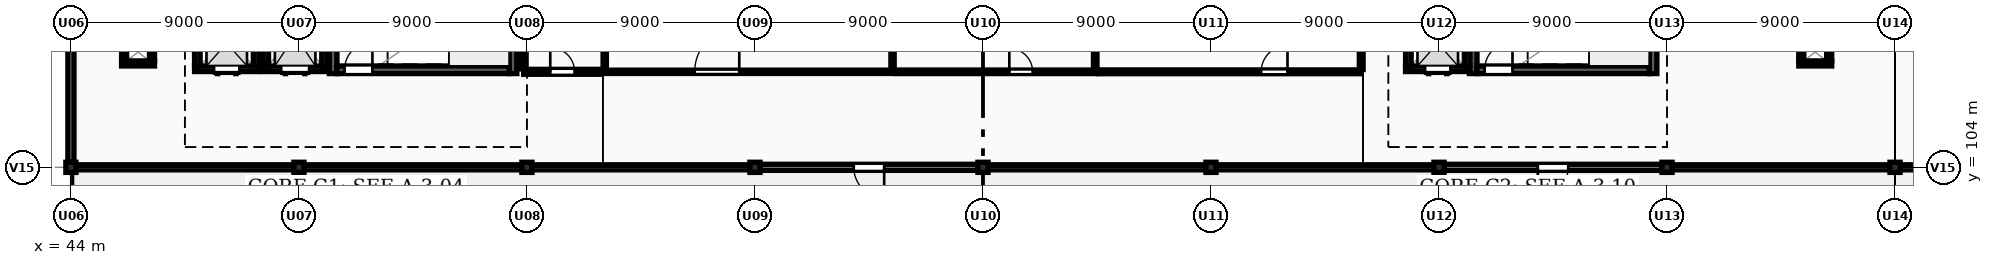
"""IFC4 building model, lengths in metres.
Left out: names, types, materials, properties, quantities, classifications, styles, units other than length and angle.
Written with IfcOpenShell. Run it as: python <this file> out.ifc"""

import sys

from ifc_helpers import new_model, si_unit, direction, frame, frame_2d, origin, origin_2d, place, context, subcontext, project, spatial, rectangle, extrude, element, fill, save


model = new_model("IFC4")
c1 = context("Model", 3, precision=1e-05, world=origin(), true_north=direction((0.0, 1.0)))
c2 = subcontext(c1, "Body", "Model", "MODEL_VIEW")
j1 = project(units=[si_unit("LENGTHUNIT", "METRE"), si_unit("PLANEANGLEUNIT", "RADIAN")], contexts=[c1])
p1 = place(None, origin())
s1 = spatial("IfcSite", under=j1, at=p1, CompositionType="ELEMENT")
p2 = place(p1, origin())
s2 = spatial("IfcBuilding", under=s1, at=p2, CompositionType="ELEMENT")
p3 = place(p2, frame((0.0, 0.0, 12.3)))
s3 = spatial("IfcBuildingStorey", under=s2, at=p3, CompositionType="ELEMENT", Elevation=12.3)
for number, where, z_axis, x_axis in (
    (1, (44.0, 104.0, 0.0), (0.0, 0.0, 1.0), (1.0, 0.0, 0.0)),
    (2, (53.0, 104.0, 0.0), (0.0, 0.0, 1.0), (1.0, 0.0, 0.0)),
    (3, (62.0, 104.0, 0.0), (0.0, 0.0, 1.0), (1.0, 0.0, 0.0)),
    (4, (71.0, 104.0, 0.0), (0.0, 0.0, 1.0), (1.0, 0.0, 0.0)),
    (5, (80.0, 104.0, 0.0), (0.0, 0.0, 1.0), (1.0, 0.0, 0.0)),
    (6, (89.0, 104.0, 0.0), (0.0, 0.0, 1.0), (1.0, 0.0, 0.0)),
    (7, (98.0, 104.0, 0.0), (0.0, 0.0, 1.0), (1.0, 0.0, 0.0)),
    (8, (107.0, 104.0, 0.0), (0.0, 0.0, 1.0), (1.0, 0.0, 0.0)),
    (9, (116.0, 104.0, 0.0), (0.0, 0.0, 1.0), (1.0, 0.0, 0.0)),
):
    element("IfcColumn", number, at=place(p3, frame(where, z_axis=z_axis, x_axis=x_axis)), inside=s3, PredefinedType="COLUMN", context=c2, shape_type="SweptSolid", body=[
        extrude(rectangle(XDim=0.4, YDim=0.4, at=origin_2d()), origin(), (0.0, 0.0, 1.0), 3.9),
    ])
p4 = place(p3, frame((115.8, 104.0, 0.0), z_axis=(0.0, 0.0, 1.0), x_axis=(-1.0, 0.0, 0.0)))
e10 = element("IfcWall", 10, at=p4, inside=s3, PredefinedType="SOLIDWALL", context=c2, shape_type="SweptSolid", body=[
    extrude(rectangle(XDim=8.6, YDim=0.2, at=frame_2d((4.3, 0.0))), origin(), (0.0, 0.0, 1.0), 0.95),
])
p5 = place(p3, frame((106.8, 104.0, 0.0), z_axis=(0.0, 0.0, 1.0), x_axis=(-1.0, 0.0, 0.0)))
e11 = element("IfcWall", 11, at=p5, inside=s3, PredefinedType="SOLIDWALL", context=c2, shape_type="SweptSolid", body=[
    extrude(rectangle(XDim=8.6, YDim=0.24, at=frame_2d((4.3, 0.0))), origin(), (0.0, 0.0, 1.0), 3.008),
])
p6 = place(p5, frame((3.7, 0.0, 0.0)))
e12 = element("IfcOpeningElement", 12, at=p6, cuts=e11, PredefinedType="OPENING", context=c2, shape_type="SweptSolid", body=[
    extrude(rectangle(XDim=1.2, YDim=2.15, at=frame_2d((0.6, 1.075))), frame((0.0, 0.13, 0.0), z_axis=(0.0, -1.0, 0.0), x_axis=(1.0, 0.0, 0.0)), (0.0, 0.0, 1.0), 0.26),
])
for number, where, z_axis, x_axis in (
    (13, (97.8, 104.0, 0.0), (0.0, 0.0, 1.0), (-1.0, 0.0, 0.0)),
    (14, (88.8, 104.0, 0.0), (0.0, 0.0, 1.0), (-1.0, 0.0, 0.0)),
):
    element("IfcWall", number, at=place(p3, frame(where, z_axis=z_axis, x_axis=x_axis)), inside=s3, PredefinedType="SOLIDWALL", context=c2, shape_type="SweptSolid", body=[
        extrude(rectangle(XDim=8.6, YDim=0.2, at=frame_2d((4.3, 0.0))), origin(), (0.0, 0.0, 1.0), 0.95),
    ])
p7 = place(p3, frame((79.8, 104.0, 0.0), z_axis=(0.0, 0.0, 1.0), x_axis=(-1.0, 0.0, 0.0)))
e15 = element("IfcWall", 15, at=p7, inside=s3, PredefinedType="SOLIDWALL", context=c2, shape_type="SweptSolid", body=[
    extrude(rectangle(XDim=8.6, YDim=0.24, at=frame_2d((4.3, 0.0))), origin(), (0.0, 0.0, 1.0), 3.008),
])
p8 = place(p7, frame((3.7, 0.0, 0.0)))
e16 = element("IfcOpeningElement", 16, at=p8, cuts=e15, PredefinedType="OPENING", context=c2, shape_type="SweptSolid", body=[
    extrude(rectangle(XDim=1.2, YDim=2.15, at=frame_2d((0.6, 1.075))), frame((0.0, 0.13, 0.0), z_axis=(0.0, -1.0, 0.0), x_axis=(1.0, 0.0, 0.0)), (0.0, 0.0, 1.0), 0.26),
])
for number, where, z_axis, x_axis in (
    (17, (70.8, 104.0, 0.0), (0.0, 0.0, 1.0), (-1.0, 0.0, 0.0)),
    (18, (61.8, 104.0, 0.0), (0.0, 0.0, 1.0), (-1.0, 0.0, 0.0)),
    (19, (52.8, 104.0, 0.0), (0.0, 0.0, 1.0), (-1.0, 0.0, 0.0)),
):
    element("IfcWall", number, at=place(p3, frame(where, z_axis=z_axis, x_axis=x_axis)), inside=s3, PredefinedType="SOLIDWALL", context=c2, shape_type="SweptSolid", body=[
        extrude(rectangle(XDim=8.6, YDim=0.2, at=frame_2d((4.3, 0.0))), origin(), (0.0, 0.0, 1.0), 0.95),
    ])
p9 = place(p3, frame((44.0, 104.2, 0.0), z_axis=(0.0, 0.0, 1.0), x_axis=(0.0, 1.0, 0.0)))
e20 = element("IfcWall", 20, at=p9, inside=s3, PredefinedType="SOLIDWALL", context=c2, shape_type="SweptSolid", body=[
    extrude(rectangle(XDim=7.6, YDim=0.24, at=frame_2d((3.8, 0.0))), origin(), (0.0, 0.0, 1.0), 3.29),
])
p10 = place(p3, frame((126.8, 104.0, 0.0), z_axis=(0.0, 0.0, 1.0), x_axis=(-1.0, 0.0, 0.0)))
e21 = element("IfcWall", 21, at=p10, inside=s3, PredefinedType="SOLIDWALL", context=c2, shape_type="SweptSolid", body=[
    extrude(rectangle(XDim=10.6, YDim=0.2, at=frame_2d((5.3, 0.0))), origin(), (0.0, 0.0, 1.0), 0.95),
])
for number, where, z_axis, x_axis in (
    (22, (54.35, 107.7, 0.0), (0.0, 0.0, 1.0), (0.0, 1.0, 0.0)),
    (23, (61.45, 111.8, 0.0), (0.0, 0.0, 1.0), (0.0, -1.0, 0.0)),
):
    element("IfcWall", number, at=place(p3, frame(where, z_axis=z_axis, x_axis=x_axis)), inside=s3, PredefinedType="SHEAR", context=c2, shape_type="SweptSolid", body=[
        extrude(rectangle(XDim=4.1, YDim=0.3, at=frame_2d((2.05, 0.0))), origin(), (0.0, 0.0, 1.0), 3.65),
    ])
p11 = place(p3, frame((54.5, 107.85, 0.0), z_axis=(0.0, 0.0, 1.0), x_axis=(1.0, 0.0, 0.0)))
e24 = element("IfcWall", 24, at=p11, inside=s3, PredefinedType="SHEAR", context=c2, shape_type="SweptSolid", body=[
    extrude(rectangle(XDim=6.8, YDim=0.3, at=frame_2d((3.4, 0.0))), origin(), (0.0, 0.0, 1.0), 3.65),
])
p12 = place(p11, frame((0.3, 0.0, 0.0)))
e25 = element("IfcOpeningElement", 25, at=p12, cuts=e24, PredefinedType="OPENING", context=c2, shape_type="SweptSolid", body=[
    extrude(rectangle(XDim=1.1, YDim=2.15, at=frame_2d((0.55, 1.075))), frame((0.0, 0.16, 0.0), z_axis=(0.0, -1.0, 0.0), x_axis=(1.0, 0.0, 0.0)), (0.0, 0.0, 1.0), 0.32),
])
p13 = place(p3, frame((54.12, 107.89, 0.0), z_axis=(0.0, 0.0, 1.0), x_axis=(-1.0, 0.0, 0.0)))
e26 = element("IfcWall", 26, at=p13, inside=s3, PredefinedType="SHEAR", context=c2, shape_type="SweptSolid", body=[
    extrude(rectangle(XDim=2.54, YDim=0.22, at=frame_2d((1.27, 0.0))), origin(), (0.0, 0.0, 1.0), 3.65),
])
p14 = place(p13, frame((0.72, 0.0, 0.0)))
e27 = element("IfcOpeningElement", 27, at=p14, cuts=e26, PredefinedType="OPENING", context=c2, shape_type="SweptSolid", body=[
    extrude(rectangle(XDim=1.1, YDim=2.15, at=frame_2d((0.55, 1.075))), frame((0.0, 0.12, 0.0), z_axis=(0.0, -1.0, 0.0), x_axis=(1.0, 0.0, 0.0)), (0.0, 0.0, 1.0), 0.24),
])
for number, where, z_axis, x_axis in (
    (28, (51.69, 108.0, 0.0), (0.0, 0.0, 1.0), (0.0, 1.0, 0.0)),
    (29, (54.01, 110.9, 0.0), (0.0, 0.0, 1.0), (0.0, -1.0, 0.0)),
):
    element("IfcWall", number, at=place(p3, frame(where, z_axis=z_axis, x_axis=x_axis)), inside=s3, PredefinedType="SHEAR", context=c2, shape_type="SweptSolid", body=[
        extrude(rectangle(XDim=2.9, YDim=0.22, at=frame_2d((1.45, 0.0))), origin(), (0.0, 0.0, 1.0), 3.65),
    ])
p15 = place(p3, frame((51.42, 107.89, 0.0), z_axis=(0.0, 0.0, 1.0), x_axis=(-1.0, 0.0, 0.0)))
e30 = element("IfcWall", 30, at=p15, inside=s3, PredefinedType="SHEAR", context=c2, shape_type="SweptSolid", body=[
    extrude(rectangle(XDim=2.54, YDim=0.22, at=frame_2d((1.27, 0.0))), origin(), (0.0, 0.0, 1.0), 3.65),
])
p16 = place(p15, frame((0.77, 0.0, 0.0)))
e31 = element("IfcOpeningElement", 31, at=p16, cuts=e30, PredefinedType="OPENING", context=c2, shape_type="SweptSolid", body=[
    extrude(rectangle(XDim=1.0, YDim=2.15, at=frame_2d((0.5, 1.075))), frame((0.0, 0.12, 0.0), z_axis=(0.0, -1.0, 0.0), x_axis=(1.0, 0.0, 0.0)), (0.0, 0.0, 1.0), 0.24),
])
for number, where, z_axis, x_axis in (
    (32, (48.99, 108.0, 0.0), (0.0, 0.0, 1.0), (0.0, 1.0, 0.0)),
    (33, (51.31, 110.3, 0.0), (0.0, 0.0, 1.0), (0.0, -1.0, 0.0)),
):
    element("IfcWall", number, at=place(p3, frame(where, z_axis=z_axis, x_axis=x_axis)), inside=s3, PredefinedType="SHEAR", context=c2, shape_type="SweptSolid", body=[
        extrude(rectangle(XDim=2.3, YDim=0.22, at=frame_2d((1.15, 0.0))), origin(), (0.0, 0.0, 1.0), 3.65),
    ])
for number, where, z_axis, x_axis in (
    (34, (99.35, 107.7, 0.0), (0.0, 0.0, 1.0), (0.0, 1.0, 0.0)),
    (35, (106.45, 111.8, 0.0), (0.0, 0.0, 1.0), (0.0, -1.0, 0.0)),
):
    element("IfcWall", number, at=place(p3, frame(where, z_axis=z_axis, x_axis=x_axis)), inside=s3, PredefinedType="SHEAR", context=c2, shape_type="SweptSolid", body=[
        extrude(rectangle(XDim=4.1, YDim=0.3, at=frame_2d((2.05, 0.0))), origin(), (0.0, 0.0, 1.0), 3.65),
    ])
p17 = place(p3, frame((99.5, 107.85, 0.0), z_axis=(0.0, 0.0, 1.0), x_axis=(1.0, 0.0, 0.0)))
e36 = element("IfcWall", 36, at=p17, inside=s3, PredefinedType="SHEAR", context=c2, shape_type="SweptSolid", body=[
    extrude(rectangle(XDim=6.8, YDim=0.3, at=frame_2d((3.4, 0.0))), origin(), (0.0, 0.0, 1.0), 3.65),
])
p18 = place(p17, frame((0.3, 0.0, 0.0)))
e37 = element("IfcOpeningElement", 37, at=p18, cuts=e36, PredefinedType="OPENING", context=c2, shape_type="SweptSolid", body=[
    extrude(rectangle(XDim=1.1, YDim=2.15, at=frame_2d((0.55, 1.075))), frame((0.0, 0.16, 0.0), z_axis=(0.0, -1.0, 0.0), x_axis=(1.0, 0.0, 0.0)), (0.0, 0.0, 1.0), 0.32),
])
p19 = place(p3, frame((99.22, 107.89, 0.0), z_axis=(0.0, 0.0, 1.0), x_axis=(-1.0, 0.0, 0.0)))
e38 = element("IfcWall", 38, at=p19, inside=s3, PredefinedType="SHEAR", context=c2, shape_type="SweptSolid", body=[
    extrude(rectangle(XDim=2.54, YDim=0.22, at=frame_2d((1.27, 0.0))), origin(), (0.0, 0.0, 1.0), 3.65),
])
p20 = place(p19, frame((0.77, 0.0, 0.0)))
e39 = element("IfcOpeningElement", 39, at=p20, cuts=e38, PredefinedType="OPENING", context=c2, shape_type="SweptSolid", body=[
    extrude(rectangle(XDim=1.0, YDim=2.15, at=frame_2d((0.5, 1.075))), frame((0.0, 0.12, 0.0), z_axis=(0.0, -1.0, 0.0), x_axis=(1.0, 0.0, 0.0)), (0.0, 0.0, 1.0), 0.24),
])
for number, where, z_axis, x_axis in (
    (40, (96.79, 108.0, 0.0), (0.0, 0.0, 1.0), (0.0, 1.0, 0.0)),
    (41, (99.11, 110.3, 0.0), (0.0, 0.0, 1.0), (0.0, -1.0, 0.0)),
):
    element("IfcWall", number, at=place(p3, frame(where, z_axis=z_axis, x_axis=x_axis)), inside=s3, PredefinedType="SHEAR", context=c2, shape_type="SweptSolid", body=[
        extrude(rectangle(XDim=2.3, YDim=0.22, at=frame_2d((1.15, 0.0))), origin(), (0.0, 0.0, 1.0), 3.65),
    ])
p21 = place(p3, frame((47.3, 108.1, 0.0), z_axis=(0.0, 0.0, 1.0), x_axis=(-1.0, 0.0, 0.0)))
e42 = element("IfcWall", 42, at=p21, inside=s3, PredefinedType="PARTITIONING", context=c2, shape_type="SweptSolid", body=[
    extrude(rectangle(XDim=1.3, YDim=0.2, at=frame_2d((0.65, 0.0))), origin(), (0.0, 0.0, 1.0), 3.65),
])
p22 = place(p3, frame((46.1, 108.2, 0.0), z_axis=(0.0, 0.0, 1.0), x_axis=(0.0, 1.0, 0.0)))
e43 = element("IfcWall", 43, at=p22, inside=s3, PredefinedType="PARTITIONING", context=c2, shape_type="SweptSolid", body=[
    extrude(rectangle(XDim=0.7, YDim=0.2, at=frame_2d((0.35, 0.0))), origin(), (0.0, 0.0, 1.0), 3.65),
])
p23 = place(p3, frame((47.2, 108.9, 0.0), z_axis=(0.0, 0.0, 1.0), x_axis=(0.0, -1.0, 0.0)))
e44 = element("IfcWall", 44, at=p23, inside=s3, PredefinedType="PARTITIONING", context=c2, shape_type="SweptSolid", body=[
    extrude(rectangle(XDim=0.7, YDim=0.2, at=frame_2d((0.35, 0.0))), origin(), (0.0, 0.0, 1.0), 3.248),
])
p24 = place(p3, frame((113.5, 108.1, 0.0), z_axis=(0.0, 0.0, 1.0), x_axis=(-1.0, 0.0, 0.0)))
e45 = element("IfcWall", 45, at=p24, inside=s3, PredefinedType="PARTITIONING", context=c2, shape_type="SweptSolid", body=[
    extrude(rectangle(XDim=1.3, YDim=0.2, at=frame_2d((0.65, 0.0))), origin(), (0.0, 0.0, 1.0), 3.65),
])
for number, where, z_axis, x_axis in (
    (46, (112.3, 108.2, 0.0), (0.0, 0.0, 1.0), (0.0, 1.0, 0.0)),
    (47, (113.4, 108.9, 0.0), (0.0, 0.0, 1.0), (0.0, -1.0, 0.0)),
):
    element("IfcWall", number, at=place(p3, frame(where, z_axis=z_axis, x_axis=x_axis)), inside=s3, PredefinedType="PARTITIONING", context=c2, shape_type="SweptSolid", body=[
        extrude(rectangle(XDim=0.7, YDim=0.2, at=frame_2d((0.35, 0.0))), origin(), (0.0, 0.0, 1.0), 3.65),
    ])
p25 = place(p3, frame((65.07, 107.77, 0.0), z_axis=(0.0, 0.0, 1.0), x_axis=(1.0, 0.0, 0.0)))
e48 = element("IfcWall", 48, at=p25, inside=s3, PredefinedType="PARTITIONING", context=c2, shape_type="SweptSolid", body=[
    extrude(rectangle(XDim=11.36, YDim=0.13, at=frame_2d((5.68, 0.0))), origin(), (0.0, 0.0, 1.0), 3.65),
])
p26 = place(p25, frame((3.55, 0.0, 0.0)))
e49 = element("IfcOpeningElement", 49, at=p26, cuts=e48, PredefinedType="OPENING", context=c2, shape_type="SweptSolid", body=[
    extrude(rectangle(XDim=1.76, YDim=2.2, at=frame_2d((0.88, 1.1))), frame((0.0, 0.075, 0.0), z_axis=(0.0, -1.0, 0.0), x_axis=(1.0, 0.0, 0.0)), (0.0, 0.0, 1.0), 0.15),
])
for number, where, z_axis, x_axis in (
    (50, (65.07, 107.85, 0.0), (0.0, 0.0, 1.0), (0.0, 1.0, 0.0)),
    (51, (76.43, 107.85, 0.0), (0.0, 0.0, 1.0), (0.0, 1.0, 0.0)),
):
    element("IfcWall", number, at=place(p3, frame(where, z_axis=z_axis, x_axis=x_axis)), inside=s3, PredefinedType="PARTITIONING", context=c2, shape_type="SweptSolid", body=[
        extrude(rectangle(XDim=4.15, YDim=0.13, at=frame_2d((2.075, 0.0))), origin(), (0.0, 0.0, 1.0), 3.65),
    ])
p27 = place(p3, frame((76.57, 107.77, 0.0), z_axis=(0.0, 0.0, 1.0), x_axis=(1.0, 0.0, 0.0)))
e52 = element("IfcWall", 52, at=p27, inside=s3, PredefinedType="PARTITIONING", context=c2, shape_type="SweptSolid", body=[
    extrude(rectangle(XDim=7.86, YDim=0.14, at=frame_2d((3.93, 0.0))), origin(), (0.0, 0.0, 1.0), 3.65),
])
p28 = place(p27, frame((4.47, 0.0, 0.0)))
e53 = element("IfcOpeningElement", 53, at=p28, cuts=e52, PredefinedType="OPENING", context=c2, shape_type="SweptSolid", body=[
    extrude(rectangle(XDim=0.92, YDim=2.2, at=frame_2d((0.46, 1.1))), frame((0.0, 0.08, 0.0), z_axis=(0.0, -1.0, 0.0), x_axis=(1.0, 0.0, 0.0)), (0.0, 0.0, 1.0), 0.16),
])
p29 = place(p3, frame((84.43, 107.855, 0.0), z_axis=(0.0, 0.0, 1.0), x_axis=(0.0, 1.0, 0.0)))
e54 = element("IfcWall", 54, at=p29, inside=s3, PredefinedType="PARTITIONING", context=c2, shape_type="SweptSolid", body=[
    extrude(rectangle(XDim=4.145, YDim=0.14, at=frame_2d((2.073, 0.0))), origin(), (0.0, 0.0, 1.0), 3.65),
])
p30 = place(p3, frame((84.57, 107.77, 0.0), z_axis=(0.0, 0.0, 1.0), x_axis=(1.0, 0.0, 0.0)))
e55 = element("IfcWall", 55, at=p30, inside=s3, PredefinedType="PARTITIONING", context=c2, shape_type="SweptSolid", body=[
    extrude(rectangle(XDim=10.36, YDim=0.15, at=frame_2d((5.18, 0.0))), origin(), (0.0, 0.0, 1.0), 3.65),
])
p31 = place(p30, frame((6.41, 0.0, 0.0)))
e56 = element("IfcOpeningElement", 56, at=p31, cuts=e55, PredefinedType="OPENING", context=c2, shape_type="SweptSolid", body=[
    extrude(rectangle(XDim=1.04, YDim=2.25, at=frame_2d((0.52, 1.125))), frame((0.0, 0.085, 0.0), z_axis=(0.0, -1.0, 0.0), x_axis=(1.0, 0.0, 0.0)), (0.0, 0.0, 1.0), 0.17),
])
p32 = place(p3, frame((94.93, 107.86, 0.0), z_axis=(0.0, 0.0, 1.0), x_axis=(0.0, 1.0, 0.0)))
e57 = element("IfcWall", 57, at=p32, inside=s3, PredefinedType="PARTITIONING", context=c2, shape_type="SweptSolid", body=[
    extrude(rectangle(XDim=4.14, YDim=0.15, at=frame_2d((2.07, 0.0))), origin(), (0.0, 0.0, 1.0), 3.248),
])
p33 = place(p3, frame((61.87, 107.77, 0.0), z_axis=(0.0, 0.0, 1.0), x_axis=(1.0, 0.0, 0.0)))
e58 = element("IfcWall", 58, at=p33, inside=s3, PredefinedType="PARTITIONING", context=c2, shape_type="SweptSolid", body=[
    extrude(rectangle(XDim=3.06, YDim=0.195, at=frame_2d((1.53, 0.0))), origin(), (0.0, 0.0, 1.0), 3.65),
])
p34 = place(p33, frame((1.05, 0.0, 0.0)))
e59 = element("IfcOpeningElement", 59, at=p34, cuts=e58, PredefinedType="OPENING", context=c2, shape_type="SweptSolid", body=[
    extrude(rectangle(XDim=0.96, YDim=2.15, at=frame_2d((0.48, 1.075))), frame((0.0, 0.107, 0.0), z_axis=(0.0, -1.0, 0.0), x_axis=(1.0, 0.0, 0.0)), (0.0, 0.0, 1.0), 0.215),
])
p35 = place(p3, frame((61.87, 107.883, 0.0), z_axis=(0.0, 0.0, 1.0), x_axis=(0.0, 1.0, 0.0)))
e60 = element("IfcWall", 60, at=p35, inside=s3, PredefinedType="PARTITIONING", context=c2, shape_type="SweptSolid", body=[
    extrude(rectangle(XDim=3.902, YDim=0.195, at=frame_2d((1.951, 0.0))), origin(), (0.0, 0.0, 1.0), 3.65),
])
p36 = place(p6, origin())
e61 = element("IfcDoor", 61, at=p36, inside=s3, OperationType="SINGLE_SWING_RIGHT", PredefinedType="DOOR", context=c2, shape_type="SweptSolid", body=[
    extrude(rectangle(XDim=1.2, YDim=2.15, at=frame_2d((0.6, 1.075))), frame((0.0, 0.025, 0.0), z_axis=(0.0, -1.0, 0.0), x_axis=(1.0, 0.0, 0.0)), (0.0, 0.0, 1.0), 0.05),
])
fill(e12, e61)
p37 = place(p8, origin())
e62 = element("IfcDoor", 62, at=p37, inside=s3, OperationType="SINGLE_SWING_LEFT", PredefinedType="DOOR", context=c2, shape_type="SweptSolid", body=[
    extrude(rectangle(XDim=1.2, YDim=2.15, at=frame_2d((0.6, 1.075))), frame((0.0, 0.025, 0.0), z_axis=(0.0, -1.0, 0.0), x_axis=(1.0, 0.0, 0.0)), (0.0, 0.0, 1.0), 0.05),
])
fill(e16, e62)
p38 = place(p12, origin())
e63 = element("IfcDoor", 63, at=p38, inside=s3, OperationType="SINGLE_SWING_RIGHT", PredefinedType="DOOR", context=c2, shape_type="SweptSolid", body=[
    extrude(rectangle(XDim=1.1, YDim=2.15, at=frame_2d((0.55, 1.075))), frame((0.0, 0.025, 0.0), z_axis=(0.0, -1.0, 0.0), x_axis=(1.0, 0.0, 0.0)), (0.0, 0.0, 1.0), 0.05),
])
fill(e25, e63)
p39 = place(p14, origin())
e64 = element("IfcDoor", 64, at=p39, inside=s3, OperationType="DOUBLE_DOOR_SLIDING", PredefinedType="DOOR", context=c2, shape_type="SweptSolid", body=[
    extrude(rectangle(XDim=1.1, YDim=2.15, at=frame_2d((0.55, 1.075))), frame((0.0, 0.025, 0.0), z_axis=(0.0, -1.0, 0.0), x_axis=(1.0, 0.0, 0.0)), (0.0, 0.0, 1.0), 0.05),
])
fill(e27, e64)
p40 = place(p16, origin())
e65 = element("IfcDoor", 65, at=p40, inside=s3, OperationType="DOUBLE_DOOR_SLIDING", PredefinedType="DOOR", context=c2, shape_type="SweptSolid", body=[
    extrude(rectangle(XDim=1.0, YDim=2.15, at=frame_2d((0.5, 1.075))), frame((0.0, 0.025, 0.0), z_axis=(0.0, -1.0, 0.0), x_axis=(1.0, 0.0, 0.0)), (0.0, 0.0, 1.0), 0.05),
])
fill(e31, e65)
p41 = place(p18, origin())
e66 = element("IfcDoor", 66, at=p41, inside=s3, OperationType="SINGLE_SWING_RIGHT", PredefinedType="DOOR", context=c2, shape_type="SweptSolid", body=[
    extrude(rectangle(XDim=1.1, YDim=2.15, at=frame_2d((0.55, 1.075))), frame((0.0, 0.025, 0.0), z_axis=(0.0, -1.0, 0.0), x_axis=(1.0, 0.0, 0.0)), (0.0, 0.0, 1.0), 0.05),
])
fill(e37, e66)
p42 = place(p20, origin())
e67 = element("IfcDoor", 67, at=p42, inside=s3, OperationType="DOUBLE_DOOR_SLIDING", PredefinedType="DOOR", context=c2, shape_type="SweptSolid", body=[
    extrude(rectangle(XDim=1.0, YDim=2.15, at=frame_2d((0.5, 1.075))), frame((0.0, 0.025, 0.0), z_axis=(0.0, -1.0, 0.0), x_axis=(1.0, 0.0, 0.0)), (0.0, 0.0, 1.0), 0.05),
])
fill(e39, e67)
p43 = place(p26, origin())
e68 = element("IfcDoor", 68, at=p43, inside=s3, OperationType="SINGLE_SWING_RIGHT", PredefinedType="DOOR", context=c2, shape_type="SweptSolid", body=[
    extrude(rectangle(XDim=1.76, YDim=2.2, at=frame_2d((0.88, 1.1))), frame((0.0, 0.025, 0.0), z_axis=(0.0, -1.0, 0.0), x_axis=(1.0, 0.0, 0.0)), (0.0, 0.0, 1.0), 0.05),
])
fill(e49, e68)
p44 = place(p28, origin())
e69 = element("IfcDoor", 69, at=p44, inside=s3, OperationType="SINGLE_SWING_LEFT", PredefinedType="DOOR", context=c2, shape_type="SweptSolid", body=[
    extrude(rectangle(XDim=0.92, YDim=2.2, at=frame_2d((0.46, 1.1))), frame((0.0, 0.025, 0.0), z_axis=(0.0, -1.0, 0.0), x_axis=(1.0, 0.0, 0.0)), (0.0, 0.0, 1.0), 0.05),
])
fill(e53, e69)
p45 = place(p31, origin())
e70 = element("IfcDoor", 70, at=p45, inside=s3, OperationType="SINGLE_SWING_RIGHT", PredefinedType="DOOR", context=c2, shape_type="SweptSolid", body=[
    extrude(rectangle(XDim=1.04, YDim=2.25, at=frame_2d((0.52, 1.125))), frame((0.0, 0.025, 0.0), z_axis=(0.0, -1.0, 0.0), x_axis=(1.0, 0.0, 0.0)), (0.0, 0.0, 1.0), 0.05),
])
fill(e56, e70)
p46 = place(p34, origin())
e71 = element("IfcDoor", 71, at=p46, inside=s3, OperationType="SINGLE_SWING_LEFT", PredefinedType="DOOR", context=c2, shape_type="SweptSolid", body=[
    extrude(rectangle(XDim=0.96, YDim=2.15, at=frame_2d((0.48, 1.075))), frame((0.0, 0.025, 0.0), z_axis=(0.0, -1.0, 0.0), x_axis=(1.0, 0.0, 0.0)), (0.0, 0.0, 1.0), 0.05),
])
fill(e59, e71)
save(model, sys.argv[1])
